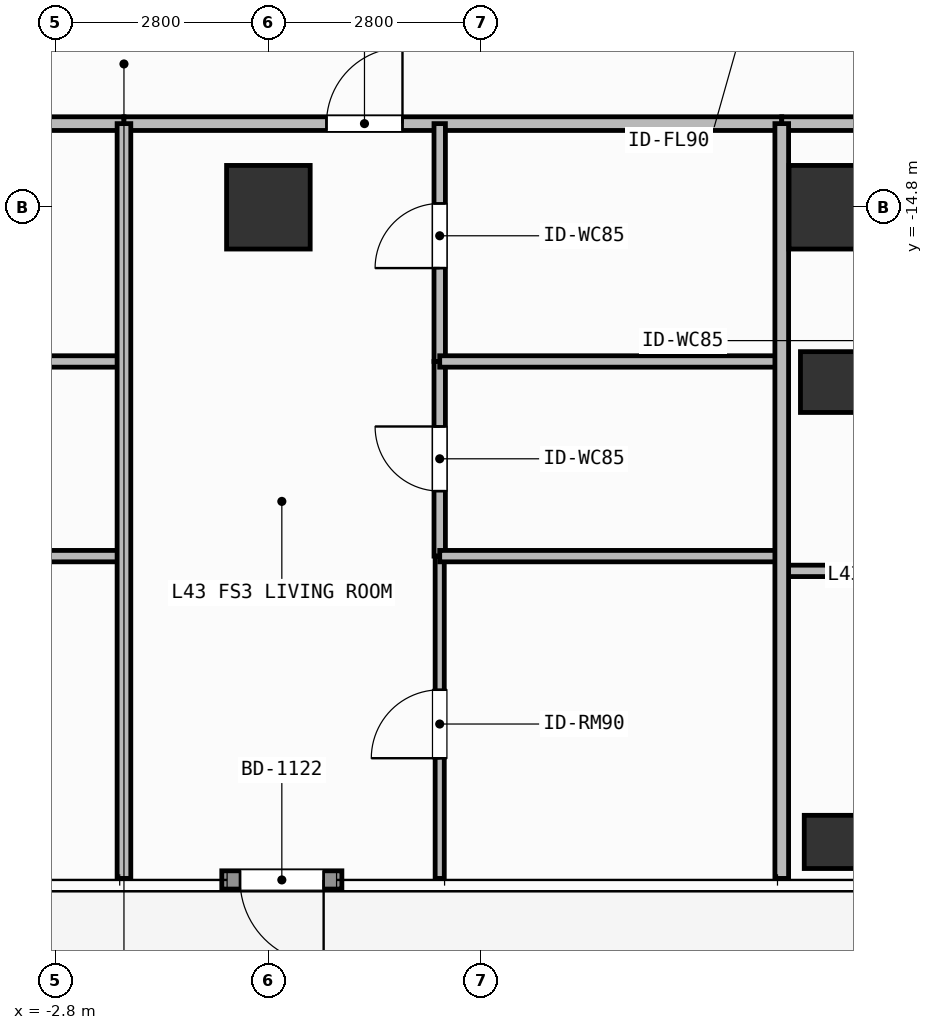
"""IFC4 building model, lengths in metres.
Left out: names, types, materials, properties, quantities, classifications, styles, units other than length and angle.
Written with IfcOpenShell. Run it as: python <this file> out.ifc"""

import sys

from ifc_helpers import new_model, si_unit, direction, frame, frame_2d, origin, origin_2d, place, context, subcontext, project, spatial, rectangle, hollow_rectangle, extrude, element, fill, save


model = new_model("IFC4")
c1 = context("Model", 3, precision=1e-05, world=origin(), true_north=direction((0.0, 1.0)))
c2 = subcontext(c1, "Body", "Model", "MODEL_VIEW")
j1 = project(units=[si_unit("LENGTHUNIT", "METRE"), si_unit("PLANEANGLEUNIT", "RADIAN")], contexts=[c1])
p1 = place(None, origin())
s1 = spatial("IfcSite", under=j1, at=p1, CompositionType="ELEMENT")
p2 = place(p1, origin())
s2 = spatial("IfcBuilding", under=s1, at=p2, CompositionType="ELEMENT")
p3 = place(p2, frame((0.0, 0.0, 175.8)))
s3 = spatial("IfcBuildingStorey", under=s2, at=p3, CompositionType="ELEMENT", Elevation=175.8)
for number, where, z_axis, x_axis in (
    (1, (0.0, -14.8, 0.0), (0.0, 0.0, 1.0), (1.0, 0.0, 0.0)),
    (2, (7.4, -14.8, 0.0), (0.0, 0.0, 1.0), (1.0, 0.0, 0.0)),
):
    element("IfcColumn", number, at=place(p3, frame(where, z_axis=z_axis, x_axis=x_axis)), inside=s3, PredefinedType="COLUMN", context=c2, shape_type="SweptSolid", body=[
        extrude(rectangle(XDim=1.1, YDim=1.1, at=origin_2d()), origin(), (0.0, 0.0, 1.0), 3.9),
    ])
p4 = place(p3, frame((7.4, -17.1, 0.0), z_axis=(0.0, 0.0, 1.0), x_axis=(1.0, 0.0, 0.0)))
e3 = element("IfcColumn", 3, at=p4, inside=s3, PredefinedType="COLUMN", context=c2, shape_type="SweptSolid", body=[
    extrude(hollow_rectangle(XDim=0.8, YDim=0.8, WallThickness=0.036, at=origin_2d()), origin(), (0.0, 0.0, 1.0), 3.9),
])
p5 = place(p3, frame((7.4, -23.15, 0.0), z_axis=(0.0, 0.0, 1.0), x_axis=(1.0, 0.0, 0.0)))
e4 = element("IfcColumn", 4, at=p5, inside=s3, PredefinedType="COLUMN", context=c2, shape_type="SweptSolid", body=[
    extrude(hollow_rectangle(XDim=0.7, YDim=0.7, WallThickness=0.032, at=origin_2d()), origin(), (0.0, 0.0, 1.0), 3.9),
])
p6 = place(p3, frame((0.967, -23.65, 0.0), z_axis=(0.0, 0.0, 1.0), x_axis=(-1.0, 0.0, 0.0)))
e5 = element("IfcWall", 5, at=p6, inside=s3, PredefinedType="SOLIDWALL", context=c2, shape_type="SweptSolid", body=[
    extrude(rectangle(XDim=1.58, YDim=0.24, at=frame_2d((0.79, 0.0))), origin(), (0.0, 0.0, 1.0), 3.68),
])
p7 = place(p6, frame((0.24, 0.0, 0.0)))
e6 = element("IfcOpeningElement", 6, at=p7, cuts=e5, PredefinedType="OPENING", context=c2, shape_type="SweptSolid", body=[
    extrude(rectangle(XDim=1.1, YDim=2.2, at=frame_2d((0.55, 1.1))), frame((0.0, 0.13, 0.0), z_axis=(0.0, -1.0, 0.0), x_axis=(1.0, 0.0, 0.0)), (0.0, 0.0, 1.0), 0.26),
])
p8 = place(p3, frame((-8.775, -13.7, 0.0), z_axis=(0.0, 0.0, 1.0), x_axis=(1.0, 0.0, 0.0)))
e7 = element("IfcWall", 7, at=p8, inside=s3, PredefinedType="PARTITIONING", context=c2, shape_type="SweptSolid", body=[
    extrude(rectangle(XDim=6.875, YDim=0.18, at=frame_2d((3.438, 0.0))), origin(), (0.0, 0.0, 1.0), 3.68),
])
p9 = place(p8, frame((2.131, 0.0, 0.0)))
e8 = element("IfcOpeningElement", 8, at=p9, cuts=e7, PredefinedType="OPENING", context=c2, shape_type="SweptSolid", body=[
    extrude(rectangle(XDim=1.0, YDim=2.2, at=frame_2d((0.5, 1.1))), frame((0.0, 0.1, 0.0), z_axis=(0.0, -1.0, 0.0), x_axis=(1.0, 0.0, 0.0)), (0.0, 0.0, 1.0), 0.2),
])
p10 = place(p3, frame((-1.9, -13.7, 0.0), z_axis=(0.0, 0.0, 1.0), x_axis=(1.0, 0.0, 0.0)))
e9 = element("IfcWall", 9, at=p10, inside=s3, PredefinedType="PARTITIONING", context=c2, shape_type="SweptSolid", body=[
    extrude(rectangle(XDim=8.654, YDim=0.18, at=frame_2d((4.327, 0.0))), origin(), (0.0, 0.0, 1.0), 3.68),
])
p11 = place(p10, frame((2.664, 0.0, 0.0)))
e10 = element("IfcOpeningElement", 10, at=p11, cuts=e9, PredefinedType="OPENING", context=c2, shape_type="SweptSolid", body=[
    extrude(rectangle(XDim=1.0, YDim=2.2, at=frame_2d((0.5, 1.1))), frame((0.0, 0.1, 0.0), z_axis=(0.0, -1.0, 0.0), x_axis=(1.0, 0.0, 0.0)), (0.0, 0.0, 1.0), 0.2),
])
p12 = place(p3, frame((2.254, -16.829, 0.0), z_axis=(0.0, 0.0, 1.0), x_axis=(0.0, 1.0, 0.0)))
e11 = element("IfcWall", 11, at=p12, inside=s3, PredefinedType="PARTITIONING", context=c2, shape_type="SweptSolid", body=[
    extrude(rectangle(XDim=3.129, YDim=0.15, at=frame_2d((1.564, 0.0))), origin(), (0.0, 0.0, 1.0), 3.68),
])
p13 = place(p12, frame((1.229, 0.0, 0.0)))
e12 = element("IfcOpeningElement", 12, at=p13, cuts=e11, PredefinedType="OPENING", context=c2, shape_type="SweptSolid", body=[
    extrude(rectangle(XDim=0.85, YDim=2.1, at=frame_2d((0.425, 1.05))), frame((0.0, 0.085, 0.0), z_axis=(0.0, -1.0, 0.0), x_axis=(1.0, 0.0, 0.0)), (0.0, 0.0, 1.0), 0.17),
])
p14 = place(p3, frame((2.254, -19.39, 0.0), z_axis=(0.0, 0.0, 1.0), x_axis=(0.0, 1.0, 0.0)))
e13 = element("IfcWall", 13, at=p14, inside=s3, PredefinedType="PARTITIONING", context=c2, shape_type="SweptSolid", body=[
    extrude(rectangle(XDim=2.561, YDim=0.15, at=frame_2d((1.28, 0.0))), origin(), (0.0, 0.0, 1.0), 3.68),
])
p15 = place(p14, frame((0.855, 0.0, 0.0)))
e14 = element("IfcOpeningElement", 14, at=p15, cuts=e13, PredefinedType="OPENING", context=c2, shape_type="SweptSolid", body=[
    extrude(rectangle(XDim=0.85, YDim=2.1, at=frame_2d((0.425, 1.05))), frame((0.0, 0.085, 0.0), z_axis=(0.0, -1.0, 0.0), x_axis=(1.0, 0.0, 0.0)), (0.0, 0.0, 1.0), 0.17),
])
p16 = place(p3, frame((2.254, -23.63, 0.0), z_axis=(0.0, 0.0, 1.0), x_axis=(0.0, 1.0, 0.0)))
e15 = element("IfcWall", 15, at=p16, inside=s3, PredefinedType="PARTITIONING", context=c2, shape_type="SweptSolid", body=[
    extrude(rectangle(XDim=4.24, YDim=0.12, at=frame_2d((2.12, 0.0))), origin(), (0.0, 0.0, 1.0), 3.68),
])
p17 = place(p16, frame((1.581, 0.0, 0.0)))
e16 = element("IfcOpeningElement", 16, at=p17, cuts=e15, PredefinedType="OPENING", context=c2, shape_type="SweptSolid", body=[
    extrude(rectangle(XDim=0.9, YDim=2.1, at=frame_2d((0.45, 1.05))), frame((0.0, 0.07, 0.0), z_axis=(0.0, -1.0, 0.0), x_axis=(1.0, 0.0, 0.0)), (0.0, 0.0, 1.0), 0.14),
])
p18 = place(p3, frame((6.754, -13.7, 0.0), z_axis=(0.0, 0.0, 1.0), x_axis=(1.0, 0.0, 0.0)))
e17 = element("IfcWall", 17, at=p18, inside=s3, PredefinedType="PARTITIONING", context=c2, shape_type="SweptSolid", body=[
    extrude(rectangle(XDim=11.566, YDim=0.18, at=frame_2d((5.783, 0.0))), origin(), (0.0, 0.0, 1.0), 3.68),
])
p19 = place(p18, frame((4.833, 0.0, 0.0)))
e18 = element("IfcOpeningElement", 18, at=p19, cuts=e17, PredefinedType="OPENING", context=c2, shape_type="SweptSolid", body=[
    extrude(rectangle(XDim=1.0, YDim=2.2, at=frame_2d((0.5, 1.1))), frame((0.0, 0.1, 0.0), z_axis=(0.0, -1.0, 0.0), x_axis=(1.0, 0.0, 0.0)), (0.0, 0.0, 1.0), 0.2),
])
p20 = place(p3, frame((-5.414, -16.829, 0.0), z_axis=(0.0, 0.0, 1.0), x_axis=(1.0, 0.0, 0.0)))
e19 = element("IfcWall", 19, at=p20, inside=s3, PredefinedType="PARTITIONING", context=c2, shape_type="SweptSolid", body=[
    extrude(rectangle(XDim=3.514, YDim=0.15, at=frame_2d((1.757, 0.0))), origin(), (0.0, 0.0, 1.0), 3.082),
])
p21 = place(p3, frame((-5.414, -19.39, 0.0), z_axis=(0.0, 0.0, 1.0), x_axis=(1.0, 0.0, 0.0)))
e20 = element("IfcWall", 20, at=p21, inside=s3, PredefinedType="PARTITIONING", context=c2, shape_type="SweptSolid", body=[
    extrude(rectangle(XDim=3.514, YDim=0.15, at=frame_2d((1.757, 0.0))), origin(), (0.0, 0.0, 1.0), 3.68),
])
p22 = place(p3, frame((2.254, -16.829, 0.0), z_axis=(0.0, 0.0, 1.0), x_axis=(1.0, 0.0, 0.0)))
e21 = element("IfcWall", 21, at=p22, inside=s3, PredefinedType="PARTITIONING", context=c2, shape_type="SweptSolid", body=[
    extrude(rectangle(XDim=4.5, YDim=0.15, at=frame_2d((2.25, 0.0))), origin(), (0.0, 0.0, 1.0), 3.082),
])
p23 = place(p3, frame((2.254, -19.39, 0.0), z_axis=(0.0, 0.0, 1.0), x_axis=(1.0, 0.0, 0.0)))
e22 = element("IfcWall", 22, at=p23, inside=s3, PredefinedType="PARTITIONING", context=c2, shape_type="SweptSolid", body=[
    extrude(rectangle(XDim=4.5, YDim=0.15, at=frame_2d((2.25, 0.0))), origin(), (0.0, 0.0, 1.0), 3.68),
])
p24 = place(p3, frame((-1.9, -23.63, 0.0), z_axis=(0.0, 0.0, 1.0), x_axis=(0.0, 1.0, 0.0)))
e23 = element("IfcWall", 23, at=p24, inside=s3, PredefinedType="PARTITIONING", context=c2, shape_type="SweptSolid", body=[
    extrude(rectangle(XDim=9.93, YDim=0.18, at=frame_2d((4.965, 0.0))), origin(), (0.0, 0.0, 1.0), 3.68),
])
p25 = place(p3, frame((6.754, -19.584, 0.0), z_axis=(0.0, 0.0, 1.0), x_axis=(1.0, 0.0, 0.0)))
e24 = element("IfcWall", 24, at=p25, inside=s3, PredefinedType="PARTITIONING", context=c2, shape_type="SweptSolid", body=[
    extrude(rectangle(XDim=3.496, YDim=0.15, at=frame_2d((1.748, 0.0))), origin(), (0.0, 0.0, 1.0), 3.68),
])
p26 = place(p3, frame((6.754, -23.63, 0.0), z_axis=(0.0, 0.0, 1.0), x_axis=(0.0, 1.0, 0.0)))
e25 = element("IfcWall", 25, at=p26, inside=s3, PredefinedType="PARTITIONING", context=c2, shape_type="SweptSolid", body=[
    extrude(rectangle(XDim=9.93, YDim=0.18, at=frame_2d((4.965, 0.0))), origin(), (0.0, 0.0, 1.0), 3.68),
])
p27 = place(p7, origin())
e26 = element("IfcDoor", 26, at=p27, inside=s3, OperationType="SINGLE_SWING_LEFT", PredefinedType="DOOR", context=c2, shape_type="SweptSolid", body=[
    extrude(rectangle(XDim=1.1, YDim=2.2, at=frame_2d((0.55, 1.1))), frame((0.0, 0.025, 0.0), z_axis=(0.0, -1.0, 0.0), x_axis=(1.0, 0.0, 0.0)), (0.0, 0.0, 1.0), 0.05),
])
fill(e6, e26)
p28 = place(p11, origin())
e27 = element("IfcDoor", 27, at=p28, inside=s3, OperationType="SINGLE_SWING_RIGHT", PredefinedType="DOOR", context=c2, shape_type="SweptSolid", body=[
    extrude(rectangle(XDim=1.0, YDim=2.2, at=frame_2d((0.5, 1.1))), frame((0.0, 0.025, 0.0), z_axis=(0.0, -1.0, 0.0), x_axis=(1.0, 0.0, 0.0)), (0.0, 0.0, 1.0), 0.05),
])
fill(e10, e27)
p29 = place(p13, origin())
e28 = element("IfcDoor", 28, at=p29, inside=s3, OperationType="SINGLE_SWING_LEFT", PredefinedType="DOOR", context=c2, shape_type="SweptSolid", body=[
    extrude(rectangle(XDim=0.85, YDim=2.1, at=frame_2d((0.425, 1.05))), frame((0.0, 0.025, 0.0), z_axis=(0.0, -1.0, 0.0), x_axis=(1.0, 0.0, 0.0)), (0.0, 0.0, 1.0), 0.05),
])
fill(e12, e28)
p30 = place(p15, origin())
e29 = element("IfcDoor", 29, at=p30, inside=s3, OperationType="SINGLE_SWING_RIGHT", PredefinedType="DOOR", context=c2, shape_type="SweptSolid", body=[
    extrude(rectangle(XDim=0.85, YDim=2.1, at=frame_2d((0.425, 1.05))), frame((0.0, 0.025, 0.0), z_axis=(0.0, -1.0, 0.0), x_axis=(1.0, 0.0, 0.0)), (0.0, 0.0, 1.0), 0.05),
])
fill(e14, e29)
p31 = place(p17, origin())
e30 = element("IfcDoor", 30, at=p31, inside=s3, OperationType="SINGLE_SWING_LEFT", PredefinedType="DOOR", context=c2, shape_type="SweptSolid", body=[
    extrude(rectangle(XDim=0.9, YDim=2.1, at=frame_2d((0.45, 1.05))), frame((0.0, 0.025, 0.0), z_axis=(0.0, -1.0, 0.0), x_axis=(1.0, 0.0, 0.0)), (0.0, 0.0, 1.0), 0.05),
])
fill(e16, e30)
save(model, sys.argv[1])
